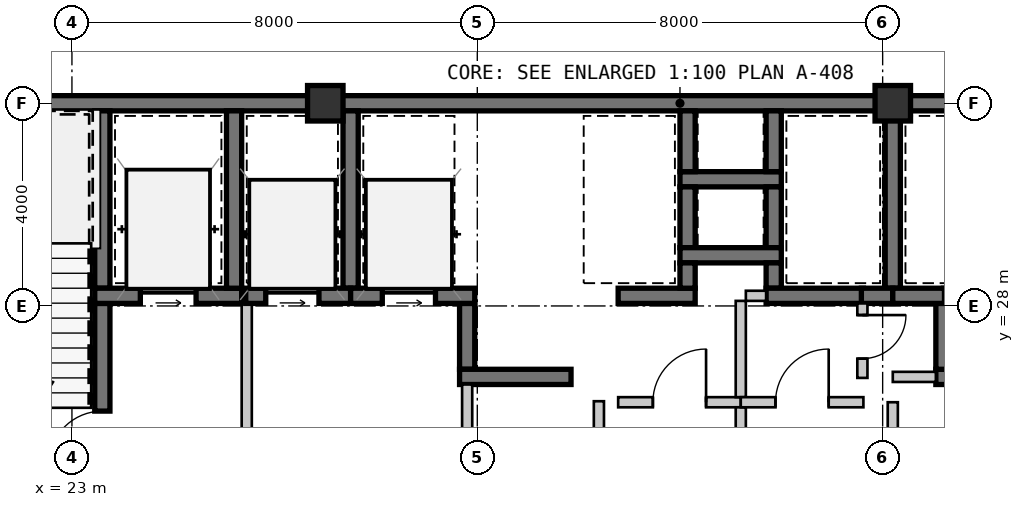
"""IFC4 building model, lengths in metres.
Left out: names, types, materials, properties, quantities, classifications, styles, units other than length and angle.
Written with IfcOpenShell. Run it as: python <this file> out.ifc"""

import sys

from ifc_helpers import new_model, si_unit, direction, frame, frame_2d, origin, origin_2d, place, context, subcontext, project, spatial, rectangle, extrude, source, transform, mapped, element, fill, save


model = new_model("IFC4")
c1 = context("Model", 3, precision=1e-05, world=origin(), true_north=direction((0.0, 1.0)))
c2 = subcontext(c1, "Body", "Model", "MODEL_VIEW")
j1 = project(units=[si_unit("LENGTHUNIT", "METRE"), si_unit("PLANEANGLEUNIT", "RADIAN")], contexts=[c1])
p1 = place(None, origin())
s1 = spatial("IfcSite", under=j1, at=p1, CompositionType="ELEMENT")
p2 = place(p1, origin())
s2 = spatial("IfcBuilding", under=s1, at=p2, CompositionType="ELEMENT")
p3 = place(p2, frame((0.0, 0.0, 80.85)))
s3 = spatial("IfcBuildingStorey", under=s2, at=p3, CompositionType="ELEMENT", Elevation=80.85)
m1 = source(origin(), c2, "Body", "SweptSolid", [
    extrude(rectangle(XDim=0.7, YDim=0.7, at=origin_2d()), origin(), (0.0, 0.0, 1.0), 3.15),
])
for number, where, z_axis, x_axis in (
    (1, (28.0, 32.0, 0.0), (0.0, 0.0, 1.0), (1.0, 0.0, 0.0)),
    (2, (39.2, 32.0, 0.0), (0.0, 0.0, 1.0), (1.0, 0.0, 0.0)),
):
    element("IfcColumn", number, at=place(p3, frame(where, z_axis=z_axis, x_axis=x_axis)), inside=s3, PredefinedType="COLUMN", context=c2, shape_type="MappedRepresentation", body=[
        mapped(m1, transform((0.0, 0.0, 0.0), scale=1.0)),
    ])
m2 = source(origin(), c2, "Body", "SweptSolid", [
    extrude(rectangle(XDim=9.15, YDim=0.3, at=frame_2d((4.575, 0.0))), origin(), (0.0, 0.0, 1.0), 2.93),
])
p4 = place(p3, frame((18.85, 32.0, 0.0), z_axis=(0.0, 0.0, 1.0), x_axis=(1.0, 0.0, 0.0)))
e3 = element("IfcWall", 3, at=p4, inside=s3, PredefinedType="SHEAR", context=c2, shape_type="MappedRepresentation", body=[
    mapped(m2, transform((0.0, 0.0, 0.0), scale=1.0)),
])
m3 = source(origin(), c2, "Body", "SweptSolid", [
    extrude(rectangle(XDim=11.2, YDim=0.3, at=frame_2d((5.6, 0.0))), origin(), (0.0, 0.0, 1.0), 2.93),
])
p5 = place(p3, frame((28.0, 32.0, 0.0), z_axis=(0.0, 0.0, 1.0), x_axis=(1.0, 0.0, 0.0)))
e4 = element("IfcWall", 4, at=p5, inside=s3, PredefinedType="SHEAR", context=c2, shape_type="MappedRepresentation", body=[
    mapped(m3, transform((0.0, 0.0, 0.0), scale=1.0)),
])
m4 = source(origin(), c2, "Body", "SweptSolid", [
    extrude(rectangle(XDim=11.95, YDim=0.3, at=frame_2d((5.975, 0.0))), origin(), (0.0, 0.0, 1.0), 2.93),
])
p6 = place(p3, frame((39.2, 32.0, 0.0), z_axis=(0.0, 0.0, 1.0), x_axis=(1.0, 0.0, 0.0)))
e5 = element("IfcWall", 5, at=p6, inside=s3, PredefinedType="SHEAR", context=c2, shape_type="MappedRepresentation", body=[
    mapped(m4, transform((0.0, 0.0, 0.0), scale=1.0)),
])
m5 = source(origin(), c2, "Body", "SweptSolid", [
    extrude(rectangle(XDim=3.5, YDim=0.3, at=frame_2d((1.75, 0.0))), origin(), (0.0, 0.0, 1.0), 2.93),
])
p7 = place(p3, frame((23.6, 28.35, 0.0), z_axis=(0.0, 0.0, 1.0), x_axis=(0.0, 1.0, 0.0)))
e6 = element("IfcWall", 6, at=p7, inside=s3, PredefinedType="SHEAR", context=c2, shape_type="MappedRepresentation", body=[
    mapped(m5, transform((0.0, 0.0, 0.0), scale=1.0)),
])
m6 = source(origin(), c2, "Body", "SweptSolid", [
    extrude(rectangle(XDim=3.9, YDim=0.3, at=frame_2d((1.95, 0.0))), origin(), (0.0, 0.0, 1.0), 2.93),
])
p8 = place(p3, frame((23.6, 24.15, 0.0), z_axis=(0.0, 0.0, 1.0), x_axis=(0.0, 1.0, 0.0)))
e7 = element("IfcWall", 7, at=p8, inside=s3, PredefinedType="SHEAR", context=c2, shape_type="MappedRepresentation", body=[
    mapped(m6, transform((0.0, 0.0, 0.0), scale=1.0)),
])
m7 = source(origin(), c2, "Body", "SweptSolid", [
    extrude(rectangle(XDim=1.05, YDim=2.1, at=frame_2d((0.525, 1.05))), frame((0.0, 0.16, 0.0), z_axis=(0.0, -1.0, 0.0), x_axis=(1.0, 0.0, 0.0)), (0.0, 0.0, 1.0), 0.32),
])
p9 = place(p8, frame((0.725, 0.0, 0.0)))
e8 = element("IfcOpeningElement", 8, at=p9, cuts=e7, PredefinedType="OPENING", context=c2, shape_type="MappedRepresentation", body=[
    mapped(m7, transform((0.0, 0.0, 0.0), scale=1.0)),
])
m8 = source(origin(), c2, "Body", "SweptSolid", [
    extrude(rectangle(XDim=2.9, YDim=0.3, at=frame_2d((1.45, 0.0))), origin(), (0.0, 0.0, 1.0), 2.93),
])
p10 = place(p3, frame((23.45, 28.2, 0.0), z_axis=(0.0, 0.0, 1.0), x_axis=(1.0, 0.0, 0.0)))
e9 = element("IfcWall", 9, at=p10, inside=s3, PredefinedType="SHEAR", context=c2, shape_type="MappedRepresentation", body=[
    mapped(m8, transform((0.0, 0.0, 0.0), scale=1.0)),
])
m9 = source(origin(), c2, "Body", "SweptSolid", [
    extrude(rectangle(XDim=1.1, YDim=2.15, at=frame_2d((0.55, 1.075))), frame((0.0, 0.16, 0.0), z_axis=(0.0, -1.0, 0.0), x_axis=(1.0, 0.0, 0.0)), (0.0, 0.0, 1.0), 0.32),
])
p11 = place(p10, frame((0.9, 0.0, 0.0)))
e10 = element("IfcOpeningElement", 10, at=p11, cuts=e9, PredefinedType="OPENING", context=c2, shape_type="MappedRepresentation", body=[
    mapped(m9, transform((0.0, 0.0, 0.0), scale=1.0)),
])
p12 = place(p3, frame((26.2, 28.35, 0.0), z_axis=(0.0, 0.0, 1.0), x_axis=(0.0, 1.0, 0.0)))
e11 = element("IfcWall", 11, at=p12, inside=s3, PredefinedType="SHEAR", context=c2, shape_type="MappedRepresentation", body=[
    mapped(m5, transform((0.0, 0.0, 0.0), scale=1.0)),
])
m10 = source(origin(), c2, "Body", "SweptSolid", [
    extrude(rectangle(XDim=3.95, YDim=0.2, at=frame_2d((1.975, 0.0))), origin(), (0.0, 0.0, 1.0), 2.93),
])
p13 = place(p3, frame((26.45, 24.1, 0.0), z_axis=(0.0, 0.0, 1.0), x_axis=(0.0, 1.0, 0.0)))
e12 = element("IfcWall", 12, at=p13, inside=s3, PredefinedType="SOLIDWALL", context=c2, shape_type="MappedRepresentation", body=[
    mapped(m10, transform((0.0, 0.0, 0.0), scale=1.0)),
])
m11 = source(origin(), c2, "Body", "SweptSolid", [
    extrude(rectangle(XDim=2.0, YDim=0.3, at=frame_2d((1.0, 0.0))), origin(), (0.0, 0.0, 1.0), 2.93),
])
p14 = place(p3, frame((35.0, 30.5, 0.0), z_axis=(0.0, 0.0, 1.0), x_axis=(1.0, 0.0, 0.0)))
e13 = element("IfcWall", 13, at=p14, inside=s3, PredefinedType="SHEAR", context=c2, shape_type="MappedRepresentation", body=[
    mapped(m11, transform((0.0, 0.0, 0.0), scale=1.0)),
])
m12 = source(origin(), c2, "Body", "SweptSolid", [
    extrude(rectangle(XDim=1.2, YDim=0.3, at=frame_2d((0.6, 0.0))), origin(), (0.0, 0.0, 1.0), 2.93),
])
for number, where, z_axis, x_axis in (
    (14, (35.15, 31.85, 0.0), (0.0, 0.0, 1.0), (0.0, -1.0, 0.0)),
    (15, (36.85, 30.65, 0.0), (0.0, 0.0, 1.0), (0.0, 1.0, 0.0)),
    (16, (35.15, 30.35, 0.0), (0.0, 0.0, 1.0), (0.0, -1.0, 0.0)),
    (17, (36.85, 29.15, 0.0), (0.0, 0.0, 1.0), (0.0, 1.0, 0.0)),
):
    element("IfcWall", number, at=place(p3, frame(where, z_axis=z_axis, x_axis=x_axis)), inside=s3, PredefinedType="SHEAR", context=c2, shape_type="MappedRepresentation", body=[
        mapped(m12, transform((0.0, 0.0, 0.0), scale=1.0)),
    ])
p15 = place(p3, frame((35.0, 29.0, 0.0), z_axis=(0.0, 0.0, 1.0), x_axis=(1.0, 0.0, 0.0)))
e18 = element("IfcWall", 18, at=p15, inside=s3, PredefinedType="SHEAR", context=c2, shape_type="MappedRepresentation", body=[
    mapped(m11, transform((0.0, 0.0, 0.0), scale=1.0)),
])
m13 = source(origin(), c2, "Body", "SweptSolid", [
    extrude(rectangle(XDim=1.3, YDim=0.3, at=frame_2d((0.65, 0.0))), origin(), (0.0, 0.0, 1.0), 2.93),
])
p16 = place(p3, frame((30.8, 28.05, 0.0), z_axis=(0.0, 0.0, 1.0), x_axis=(0.0, -1.0, 0.0)))
e19 = element("IfcWall", 19, at=p16, inside=s3, PredefinedType="SHEAR", context=c2, shape_type="MappedRepresentation", body=[
    mapped(m13, transform((0.0, 0.0, 0.0), scale=1.0)),
])
m14 = source(origin(), c2, "Body", "SweptSolid", [
    extrude(rectangle(XDim=2.2, YDim=0.3, at=frame_2d((1.1, 0.0))), origin(), (0.0, 0.0, 1.0), 2.93),
])
p17 = place(p3, frame((30.65, 26.6, 0.0), z_axis=(0.0, 0.0, 1.0), x_axis=(1.0, 0.0, 0.0)))
e20 = element("IfcWall", 20, at=p17, inside=s3, PredefinedType="SHEAR", context=c2, shape_type="MappedRepresentation", body=[
    mapped(m14, transform((0.0, 0.0, 0.0), scale=1.0)),
])
m15 = source(origin(), c2, "Body", "SweptSolid", [
    extrude(rectangle(XDim=1.32, YDim=0.3, at=frame_2d((0.66, 0.0))), origin(), (0.0, 0.0, 1.0), 2.93),
])
p18 = place(p3, frame((41.52, 28.2, 0.0), z_axis=(0.0, 0.0, 1.0), x_axis=(-1.0, 0.0, 0.0)))
e21 = element("IfcWall", 21, at=p18, inside=s3, PredefinedType="SHEAR", context=c2, shape_type="MappedRepresentation", body=[
    mapped(m15, transform((0.0, 0.0, 0.0), scale=1.0)),
])
m16 = source(origin(), c2, "Body", "SweptSolid", [
    extrude(rectangle(XDim=1.47, YDim=0.3, at=frame_2d((0.735, 0.0))), origin(), (0.0, 0.0, 1.0), 2.93),
])
p19 = place(p3, frame((40.05, 26.6, 0.0), z_axis=(0.0, 0.0, 1.0), x_axis=(1.0, 0.0, 0.0)))
e22 = element("IfcWall", 22, at=p19, inside=s3, PredefinedType="SHEAR", context=c2, shape_type="MappedRepresentation", body=[
    mapped(m16, transform((0.0, 0.0, 0.0), scale=1.0)),
])
p20 = place(p3, frame((40.2, 28.05, 0.0), z_axis=(0.0, 0.0, 1.0), x_axis=(0.0, -1.0, 0.0)))
e23 = element("IfcWall", 23, at=p20, inside=s3, PredefinedType="SHEAR", context=c2, shape_type="MappedRepresentation", body=[
    mapped(m13, transform((0.0, 0.0, 0.0), scale=1.0)),
])
p21 = place(p3, frame((28.5, 28.35, 0.0), z_axis=(0.0, 0.0, 1.0), x_axis=(0.0, 1.0, 0.0)))
e24 = element("IfcWall", 24, at=p21, inside=s3, PredefinedType="SHEAR", context=c2, shape_type="MappedRepresentation", body=[
    mapped(m5, transform((0.0, 0.0, 0.0), scale=1.0)),
])
m17 = source(origin(), c2, "Body", "SweptSolid", [
    extrude(rectangle(XDim=2.07, YDim=0.3, at=frame_2d((1.035, 0.0))), origin(), (0.0, 0.0, 1.0), 2.93),
])
p22 = place(p3, frame((26.43, 28.2, 0.0), z_axis=(0.0, 0.0, 1.0), x_axis=(1.0, 0.0, 0.0)))
e25 = element("IfcWall", 25, at=p22, inside=s3, PredefinedType="SHEAR", context=c2, shape_type="MappedRepresentation", body=[
    mapped(m17, transform((0.0, 0.0, 0.0), scale=1.0)),
])
m18 = source(origin(), c2, "Body", "SweptSolid", [
    extrude(rectangle(XDim=1.05, YDim=2.15, at=frame_2d((0.525, 1.075))), frame((0.0, 0.16, 0.0), z_axis=(0.0, -1.0, 0.0), x_axis=(1.0, 0.0, 0.0)), (0.0, 0.0, 1.0), 0.32),
])
p23 = place(p22, frame((0.395, 0.0, 0.0)))
e26 = element("IfcOpeningElement", 26, at=p23, cuts=e25, PredefinedType="OPENING", context=c2, shape_type="MappedRepresentation", body=[
    mapped(m18, transform((0.0, 0.0, 0.0), scale=1.0)),
])
m19 = source(origin(), c2, "Body", "SweptSolid", [
    extrude(rectangle(XDim=2.45, YDim=0.3, at=frame_2d((1.225, 0.0))), origin(), (0.0, 0.0, 1.0), 2.93),
])
p24 = place(p3, frame((28.5, 28.2, 0.0), z_axis=(0.0, 0.0, 1.0), x_axis=(1.0, 0.0, 0.0)))
e27 = element("IfcWall", 27, at=p24, inside=s3, PredefinedType="SHEAR", context=c2, shape_type="MappedRepresentation", body=[
    mapped(m19, transform((0.0, 0.0, 0.0), scale=1.0)),
])
p25 = place(p24, frame((0.625, 0.0, 0.0)))
e28 = element("IfcOpeningElement", 28, at=p25, cuts=e27, PredefinedType="OPENING", context=c2, shape_type="MappedRepresentation", body=[
    mapped(m18, transform((0.0, 0.0, 0.0), scale=1.0)),
])
m20 = source(origin(), c2, "Body", "SweptSolid", [
    extrude(rectangle(XDim=2.35, YDim=0.2, at=frame_2d((1.175, 0.0))), origin(), (0.0, 0.0, 1.0), 2.93),
])
p26 = place(p3, frame((30.8, 26.45, 0.0), z_axis=(0.0, 0.0, 1.0), x_axis=(0.0, -1.0, 0.0)))
e29 = element("IfcWall", 29, at=p26, inside=s3, PredefinedType="SOLIDWALL", context=c2, shape_type="MappedRepresentation", body=[
    mapped(m20, transform((0.0, 0.0, 0.0), scale=1.0)),
])
m21 = source(origin(), c2, "Body", "SweptSolid", [
    extrude(rectangle(XDim=1.52, YDim=0.3, at=frame_2d((0.76, 0.0))), origin(), (0.0, 0.0, 1.0), 2.93),
])
p27 = place(p3, frame((33.78, 28.2, 0.0), z_axis=(0.0, 0.0, 1.0), x_axis=(1.0, 0.0, 0.0)))
e30 = element("IfcWall", 30, at=p27, inside=s3, PredefinedType="SHEAR", context=c2, shape_type="MappedRepresentation", body=[
    mapped(m21, transform((0.0, 0.0, 0.0), scale=1.0)),
])
m22 = source(origin(), c2, "Body", "SweptSolid", [
    extrude(rectangle(XDim=0.5, YDim=0.3, at=frame_2d((0.25, 0.0))), origin(), (0.0, 0.0, 1.0), 2.93),
])
p28 = place(p3, frame((35.15, 28.35, 0.0), z_axis=(0.0, 0.0, 1.0), x_axis=(0.0, 1.0, 0.0)))
e31 = element("IfcWall", 31, at=p28, inside=s3, PredefinedType="SHEAR", context=c2, shape_type="MappedRepresentation", body=[
    mapped(m22, transform((0.0, 0.0, 0.0), scale=1.0)),
])
p29 = place(p3, frame((39.2, 28.35, 0.0), z_axis=(0.0, 0.0, 1.0), x_axis=(0.0, 1.0, 0.0)))
e32 = element("IfcWall", 32, at=p29, inside=s3, PredefinedType="SHEAR", context=c2, shape_type="MappedRepresentation", body=[
    mapped(m5, transform((0.0, 0.0, 0.0), scale=1.0)),
])
p30 = place(p3, frame((36.85, 28.85, 0.0), z_axis=(0.0, 0.0, 1.0), x_axis=(0.0, -1.0, 0.0)))
e33 = element("IfcWall", 33, at=p30, inside=s3, PredefinedType="SHEAR", context=c2, shape_type="MappedRepresentation", body=[
    mapped(m22, transform((0.0, 0.0, 0.0), scale=1.0)),
])
m23 = source(origin(), c2, "Body", "SweptSolid", [
    extrude(rectangle(XDim=1.92, YDim=0.3, at=frame_2d((0.96, 0.0))), origin(), (0.0, 0.0, 1.0), 2.93),
])
p31 = place(p3, frame((36.7, 28.2, 0.0), z_axis=(0.0, 0.0, 1.0), x_axis=(1.0, 0.0, 0.0)))
e34 = element("IfcWall", 34, at=p31, inside=s3, PredefinedType="SHEAR", context=c2, shape_type="MappedRepresentation", body=[
    mapped(m23, transform((0.0, 0.0, 0.0), scale=1.0)),
])
m24 = source(origin(), c2, "Body", "SweptSolid", [
    extrude(rectangle(XDim=0.62, YDim=0.3, at=frame_2d((0.31, 0.0))), origin(), (0.0, 0.0, 1.0), 2.93),
])
p32 = place(p3, frame((38.58, 28.2, 0.0), z_axis=(0.0, 0.0, 1.0), x_axis=(1.0, 0.0, 0.0)))
e35 = element("IfcWall", 35, at=p32, inside=s3, PredefinedType="SHEAR", context=c2, shape_type="MappedRepresentation", body=[
    mapped(m24, transform((0.0, 0.0, 0.0), scale=1.0)),
])
m25 = source(origin(), c2, "Body", "SweptSolid", [
    extrude(rectangle(XDim=1.02, YDim=0.3, at=frame_2d((0.51, 0.0))), origin(), (0.0, 0.0, 1.0), 2.93),
])
p33 = place(p3, frame((39.2, 28.2, 0.0), z_axis=(0.0, 0.0, 1.0), x_axis=(1.0, 0.0, 0.0)))
e36 = element("IfcWall", 36, at=p33, inside=s3, PredefinedType="SHEAR", context=c2, shape_type="MappedRepresentation", body=[
    mapped(m25, transform((0.0, 0.0, 0.0), scale=1.0)),
])
m26 = source(origin(), c2, "Body", "SweptSolid", [
    extrude(rectangle(XDim=2.02, YDim=0.2, at=frame_2d((1.01, 0.0))), origin(), (0.0, 0.0, 1.0), 2.93),
])
p34 = place(p3, frame((33.4, 26.12, 0.0), z_axis=(0.0, 0.0, 1.0), x_axis=(0.0, -1.0, 0.0)))
e37 = element("IfcWall", 37, at=p34, inside=s3, PredefinedType="SOLIDWALL", context=c2, shape_type="MappedRepresentation", body=[
    mapped(m26, transform((0.0, 0.0, 0.0), scale=1.0)),
])
m27 = source(origin(), c2, "Body", "SweptSolid", [
    extrude(rectangle(XDim=2.42, YDim=0.2, at=frame_2d((1.21, 0.0))), origin(), (0.0, 0.0, 1.0), 2.93),
])
p35 = place(p3, frame((33.78, 26.1, 0.0), z_axis=(0.0, 0.0, 1.0), x_axis=(1.0, 0.0, 0.0)))
e38 = element("IfcWall", 38, at=p35, inside=s3, PredefinedType="SOLIDWALL", context=c2, shape_type="MappedRepresentation", body=[
    mapped(m27, transform((0.0, 0.0, 0.0), scale=1.0)),
])
m28 = source(origin(), c2, "Body", "SweptSolid", [
    extrude(rectangle(XDim=1.05, YDim=2.1, at=frame_2d((0.525, 1.05))), frame((0.0, 0.11, 0.0), z_axis=(0.0, -1.0, 0.0), x_axis=(1.0, 0.0, 0.0)), (0.0, 0.0, 1.0), 0.22),
])
p36 = place(p35, frame((0.685, 0.0, 0.0)))
e39 = element("IfcOpeningElement", 39, at=p36, cuts=e38, PredefinedType="OPENING", context=c2, shape_type="MappedRepresentation", body=[
    mapped(m28, transform((0.0, 0.0, 0.0), scale=1.0)),
])
m29 = source(origin(), c2, "Body", "SweptSolid", [
    extrude(rectangle(XDim=1.9, YDim=0.2, at=frame_2d((0.95, 0.0))), origin(), (0.0, 0.0, 1.0), 2.93),
])
p37 = place(p3, frame((36.2, 26.0, 0.0), z_axis=(0.0, 0.0, 1.0), x_axis=(0.0, -1.0, 0.0)))
e40 = element("IfcWall", 40, at=p37, inside=s3, PredefinedType="SOLIDWALL", context=c2, shape_type="MappedRepresentation", body=[
    mapped(m29, transform((0.0, 0.0, 0.0), scale=1.0)),
])
m30 = source(origin(), c2, "Body", "SweptSolid", [
    extrude(rectangle(XDim=1.9, YDim=0.2, at=frame_2d((0.95, 0.0))), origin(), (0.0, 0.0, 1.0), 2.93),
])
p38 = place(p3, frame((36.2, 28.1, 0.0), z_axis=(0.0, 0.0, 1.0), x_axis=(0.0, -1.0, 0.0)))
e41 = element("IfcWall", 41, at=p38, inside=s3, PredefinedType="SOLIDWALL", context=c2, shape_type="MappedRepresentation", body=[
    mapped(m30, transform((0.0, 0.0, 0.0), scale=1.0)),
])
m31 = source(origin(), c2, "Body", "SweptSolid", [
    extrude(rectangle(XDim=0.4, YDim=0.2, at=frame_2d((0.2, 0.0))), origin(), (0.0, 0.0, 1.0), 2.93),
])
p39 = place(p3, frame((36.7, 28.2, 0.0), z_axis=(0.0, 0.0, 1.0), x_axis=(-1.0, 0.0, 0.0)))
e42 = element("IfcWall", 42, at=p39, inside=s3, PredefinedType="SOLIDWALL", context=c2, shape_type="MappedRepresentation", body=[
    mapped(m31, transform((0.0, 0.0, 0.0), scale=1.0)),
])
m32 = source(origin(), c2, "Body", "SweptSolid", [
    extrude(rectangle(XDim=2.42, YDim=0.2, at=frame_2d((1.21, 0.0))), origin(), (0.0, 0.0, 1.0), 2.93),
])
p40 = place(p3, frame((36.2, 26.1, 0.0), z_axis=(0.0, 0.0, 1.0), x_axis=(1.0, 0.0, 0.0)))
e43 = element("IfcWall", 43, at=p40, inside=s3, PredefinedType="SOLIDWALL", context=c2, shape_type="MappedRepresentation", body=[
    mapped(m32, transform((0.0, 0.0, 0.0), scale=1.0)),
])
p41 = place(p40, frame((0.685, 0.0, 0.0)))
e44 = element("IfcOpeningElement", 44, at=p41, cuts=e43, PredefinedType="OPENING", context=c2, shape_type="MappedRepresentation", body=[
    mapped(m28, transform((0.0, 0.0, 0.0), scale=1.0)),
])
m33 = source(origin(), c2, "Body", "SweptSolid", [
    extrude(rectangle(XDim=2.0, YDim=0.2, at=frame_2d((1.0, 0.0))), origin(), (0.0, 0.0, 1.0), 2.47),
])
p42 = place(p3, frame((39.2, 26.1, 0.0), z_axis=(0.0, 0.0, 1.0), x_axis=(0.0, -1.0, 0.0)))
e45 = element("IfcWall", 45, at=p42, inside=s3, PredefinedType="SOLIDWALL", context=c2, shape_type="MappedRepresentation", body=[
    mapped(m33, transform((0.0, 0.0, 0.0), scale=1.0)),
])
m34 = source(origin(), c2, "Body", "SweptSolid", [
    extrude(rectangle(XDim=1.47, YDim=0.2, at=frame_2d((0.735, 0.0))), origin(), (0.0, 0.0, 1.0), 2.93),
])
p43 = place(p3, frame((38.6, 28.05, 0.0), z_axis=(0.0, 0.0, 1.0), x_axis=(0.0, -1.0, 0.0)))
e46 = element("IfcWall", 46, at=p43, inside=s3, PredefinedType="SOLIDWALL", context=c2, shape_type="MappedRepresentation", body=[
    mapped(m34, transform((0.0, 0.0, 0.0), scale=1.0)),
])
m35 = source(origin(), c2, "Body", "SweptSolid", [
    extrude(rectangle(XDim=0.86, YDim=2.1, at=frame_2d((0.43, 1.05))), frame((0.0, 0.11, 0.0), z_axis=(0.0, -1.0, 0.0), x_axis=(1.0, 0.0, 0.0)), (0.0, 0.0, 1.0), 0.22),
])
p44 = place(p43, frame((0.23, 0.0, 0.0)))
e47 = element("IfcOpeningElement", 47, at=p44, cuts=e46, PredefinedType="OPENING", context=c2, shape_type="MappedRepresentation", body=[
    mapped(m35, transform((0.0, 0.0, 0.0), scale=1.0)),
])
m36 = source(origin(), c2, "Body", "SweptSolid", [
    extrude(rectangle(XDim=0.85, YDim=0.2, at=frame_2d((0.425, 0.0))), origin(), (0.0, 0.0, 1.0), 2.93),
])
p45 = place(p3, frame((39.2, 26.6, 0.0), z_axis=(0.0, 0.0, 1.0), x_axis=(1.0, 0.0, 0.0)))
e48 = element("IfcWall", 48, at=p45, inside=s3, PredefinedType="SOLIDWALL", context=c2, shape_type="MappedRepresentation", body=[
    mapped(m36, transform((0.0, 0.0, 0.0), scale=1.0)),
])
m37 = source(origin(), c2, "Body", "SweptSolid", [
    extrude(rectangle(XDim=1.05, YDim=2.1, at=frame_2d((0.525, 1.05))), frame((0.0, 0.025, 0.0), z_axis=(0.0, -1.0, 0.0), x_axis=(1.0, 0.0, 0.0)), (0.0, 0.0, 1.0), 0.05),
])
p46 = place(p9, origin())
e49 = element("IfcDoor", 49, at=p46, inside=s3, OperationType="SINGLE_SWING_LEFT", PredefinedType="DOOR", context=c2, shape_type="MappedRepresentation", body=[
    mapped(m37, transform((0.0, 0.0, 0.0), scale=1.0)),
])
fill(e8, e49)
m38 = source(origin(), c2, "Body", "SweptSolid", [
    extrude(rectangle(XDim=1.1, YDim=2.15, at=frame_2d((0.55, 1.075))), frame((0.0, 0.025, 0.0), z_axis=(0.0, -1.0, 0.0), x_axis=(1.0, 0.0, 0.0)), (0.0, 0.0, 1.0), 0.05),
])
p47 = place(p11, origin())
e50 = element("IfcDoor", 50, at=p47, inside=s3, OperationType="SLIDING_TO_LEFT", PredefinedType="DOOR", context=c2, shape_type="MappedRepresentation", body=[
    mapped(m38, transform((0.0, 0.0, 0.0), scale=1.0)),
])
fill(e10, e50)
m39 = source(origin(), c2, "Body", "SweptSolid", [
    extrude(rectangle(XDim=1.05, YDim=2.15, at=frame_2d((0.525, 1.075))), frame((0.0, 0.025, 0.0), z_axis=(0.0, -1.0, 0.0), x_axis=(1.0, 0.0, 0.0)), (0.0, 0.0, 1.0), 0.05),
])
p48 = place(p23, origin())
e51 = element("IfcDoor", 51, at=p48, inside=s3, OperationType="SLIDING_TO_LEFT", PredefinedType="DOOR", context=c2, shape_type="MappedRepresentation", body=[
    mapped(m39, transform((0.0, 0.0, 0.0), scale=1.0)),
])
fill(e26, e51)
p49 = place(p25, origin())
e52 = element("IfcDoor", 52, at=p49, inside=s3, OperationType="SLIDING_TO_LEFT", PredefinedType="DOOR", context=c2, shape_type="MappedRepresentation", body=[
    mapped(m39, transform((0.0, 0.0, 0.0), scale=1.0)),
])
fill(e28, e52)
p50 = place(p36, origin())
e53 = element("IfcDoor", 53, at=p50, inside=s3, OperationType="SINGLE_SWING_RIGHT", PredefinedType="DOOR", context=c2, shape_type="MappedRepresentation", body=[
    mapped(m37, transform((0.0, 0.0, 0.0), scale=1.0)),
])
fill(e39, e53)
p51 = place(p41, origin())
e54 = element("IfcDoor", 54, at=p51, inside=s3, OperationType="SINGLE_SWING_RIGHT", PredefinedType="DOOR", context=c2, shape_type="MappedRepresentation", body=[
    mapped(m37, transform((0.0, 0.0, 0.0), scale=1.0)),
])
fill(e44, e54)
m40 = source(origin(), c2, "Body", "SweptSolid", [
    extrude(rectangle(XDim=0.86, YDim=2.1, at=frame_2d((0.43, 1.05))), frame((0.0, 0.025, 0.0), z_axis=(0.0, -1.0, 0.0), x_axis=(1.0, 0.0, 0.0)), (0.0, 0.0, 1.0), 0.05),
])
p52 = place(p44, origin())
e55 = element("IfcDoor", 55, at=p52, inside=s3, OperationType="SINGLE_SWING_LEFT", PredefinedType="DOOR", context=c2, shape_type="MappedRepresentation", body=[
    mapped(m40, transform((0.0, 0.0, 0.0), scale=1.0)),
])
fill(e47, e55)
save(model, sys.argv[1])
